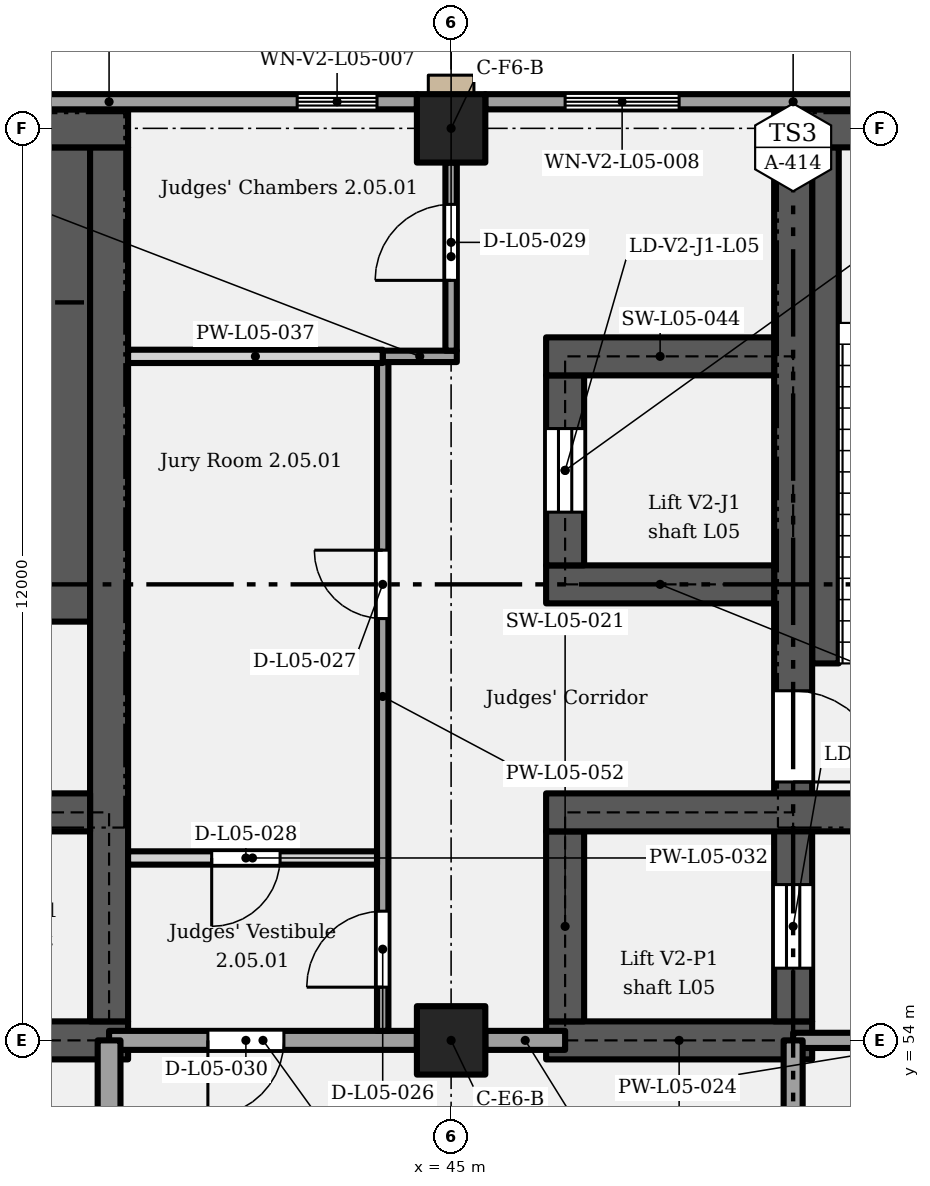
"""IFC4 building model, lengths in metres.
Left out: names, types, materials, properties, quantities, classifications, styles, units other than length and angle.
Written with IfcOpenShell. Run it as: python <this file> out.ifc"""

import sys

from ifc_helpers import new_model, si_unit, direction, frame, frame_2d, origin, origin_2d, place, context, subcontext, project, spatial, rectangle, extrude, element, fill, save


model = new_model("IFC4")
c1 = context("Model", 3, precision=1e-05, world=origin(), true_north=direction((0.0, 1.0)))
c2 = subcontext(c1, "Body", "Model", "MODEL_VIEW")
j1 = project(units=[si_unit("LENGTHUNIT", "METRE"), si_unit("PLANEANGLEUNIT", "RADIAN")], contexts=[c1])
p1 = place(None, origin())
s1 = spatial("IfcSite", under=j1, at=p1, CompositionType="ELEMENT")
p2 = place(p1, origin())
s2 = spatial("IfcBuilding", under=s1, at=p2, CompositionType="ELEMENT")
p3 = place(p2, frame((0.0, 0.0, 28.2)))
s3 = spatial("IfcBuildingStorey", under=s2, at=p3, CompositionType="ELEMENT", Elevation=28.2)
for number, where, z_axis, x_axis in (
    (1, (45.0, 54.0, 0.0), (0.0, 0.0, 1.0), (1.0, 0.0, 0.0)),
    (2, (45.0, 66.0, 0.0), (0.0, 0.0, 1.0), (1.0, 0.0, 0.0)),
):
    element("IfcColumn", number, at=place(p3, frame(where, z_axis=z_axis, x_axis=x_axis)), inside=s3, PredefinedType="COLUMN", context=c2, shape_type="SweptSolid", body=[
        extrude(rectangle(XDim=0.9, YDim=0.9, at=origin_2d()), origin(), (0.0, 0.0, 1.0), 5.4),
    ])
p4 = place(p3, frame((38.15, 54.0, 0.0), z_axis=(0.0, 0.0, 1.0), x_axis=(1.0, 0.0, 0.0)))
e3 = element("IfcWall", 3, at=p4, inside=s3, PredefinedType="SHEAR", context=c2, shape_type="SweptSolid", body=[
    extrude(rectangle(XDim=2.6, YDim=0.5, at=frame_2d((1.3, 0.0))), origin(), (0.0, 0.0, 1.0), 5.15),
])
p5 = place(p3, frame((46.25, 54.0, 0.0), z_axis=(0.0, 0.0, 1.0), x_axis=(1.0, 0.0, 0.0)))
e4 = element("IfcWall", 4, at=p5, inside=s3, PredefinedType="SHEAR", context=c2, shape_type="SweptSolid", body=[
    extrude(rectangle(XDim=3.5, YDim=0.5, at=frame_2d((1.75, 0.0))), origin(), (0.0, 0.0, 1.0), 5.15),
])
p6 = place(p3, frame((40.5, 54.25, 0.0), z_axis=(0.0, 0.0, 1.0), x_axis=(0.0, 1.0, 0.0)))
e5 = element("IfcWall", 5, at=p6, inside=s3, PredefinedType="SHEAR", context=c2, shape_type="SweptSolid", body=[
    extrude(rectangle(XDim=11.5, YDim=0.5, at=frame_2d((5.75, 0.0))), origin(), (0.0, 0.0, 1.0), 5.15),
])
p7 = place(p3, frame((46.5, 54.25, 0.0), z_axis=(0.0, 0.0, 1.0), x_axis=(0.0, 1.0, 0.0)))
e6 = element("IfcWall", 6, at=p7, inside=s3, PredefinedType="SHEAR", context=c2, shape_type="SweptSolid", body=[
    extrude(rectangle(XDim=2.5, YDim=0.5, at=frame_2d((1.25, 0.0))), origin(), (0.0, 0.0, 1.0), 5.15),
])
p8 = place(p3, frame((49.5, 54.25, 0.0), z_axis=(0.0, 0.0, 1.0), x_axis=(0.0, 1.0, 0.0)))
e7 = element("IfcWall", 7, at=p8, inside=s3, PredefinedType="SHEAR", context=c2, shape_type="SweptSolid", body=[
    extrude(rectangle(XDim=11.5, YDim=0.5, at=frame_2d((5.75, 0.0))), origin(), (0.0, 0.0, 1.0), 5.15),
])
p9 = place(p8, frame((0.7, 0.0, 0.0)))
e8 = element("IfcOpeningElement", 8, at=p9, cuts=e7, PredefinedType="OPENING", context=c2, shape_type="SweptSolid", body=[
    extrude(rectangle(XDim=1.1, YDim=2.1, at=frame_2d((0.55, 1.05))), frame((0.0, 0.26, 0.0), z_axis=(0.0, -1.0, 0.0), x_axis=(1.0, 0.0, 0.0)), (0.0, 0.0, 1.0), 0.52),
])
p10 = place(p8, frame((4.35, 0.0, 0.0), z_axis=(0.0, 0.0, 1.0), x_axis=(-1.0, 0.0, 0.0)))
e9 = element("IfcOpeningElement", 9, at=p10, cuts=e7, PredefinedType="OPENING", context=c2, shape_type="SweptSolid", body=[
    extrude(rectangle(XDim=1.2, YDim=2.1, at=frame_2d((0.6, 1.05))), frame((0.0, 0.26, 0.0), z_axis=(0.0, -1.0, 0.0), x_axis=(1.0, 0.0, 0.0)), (0.0, 0.0, 1.0), 0.52),
])
p11 = place(p3, frame((35.75, 57.0, 0.0), z_axis=(0.0, 0.0, 1.0), x_axis=(1.0, 0.0, 0.0)))
e10 = element("IfcWall", 10, at=p11, inside=s3, PredefinedType="SHEAR", context=c2, shape_type="SweptSolid", body=[
    extrude(rectangle(XDim=4.5, YDim=0.5, at=frame_2d((2.25, 0.0))), origin(), (0.0, 0.0, 1.0), 5.15),
])
p12 = place(p11, frame((0.85, 0.0, 0.0)))
e11 = element("IfcOpeningElement", 11, at=p12, cuts=e10, PredefinedType="OPENING", context=c2, shape_type="SweptSolid", body=[
    extrude(rectangle(XDim=1.2, YDim=2.1, at=frame_2d((0.6, 1.05))), frame((0.0, 0.26, 0.0), z_axis=(0.0, -1.0, 0.0), x_axis=(1.0, 0.0, 0.0)), (0.0, 0.0, 1.0), 0.52),
])
p13 = place(p3, frame((46.25, 57.0, 0.0), z_axis=(0.0, 0.0, 1.0), x_axis=(1.0, 0.0, 0.0)))
e12 = element("IfcWall", 12, at=p13, inside=s3, PredefinedType="SHEAR", context=c2, shape_type="SweptSolid", body=[
    extrude(rectangle(XDim=11.0, YDim=0.5, at=frame_2d((5.5, 0.0))), origin(), (0.0, 0.0, 1.0), 5.15),
])
p14 = place(p13, frame((4.9, 0.0, 0.0)))
e13 = element("IfcOpeningElement", 13, at=p14, cuts=e12, PredefinedType="OPENING", context=c2, shape_type="SweptSolid", body=[
    extrude(rectangle(XDim=1.2, YDim=2.1, at=frame_2d((0.6, 1.05))), frame((0.0, 0.26, 0.0), z_axis=(0.0, -1.0, 0.0), x_axis=(1.0, 0.0, 0.0)), (0.0, 0.0, 1.0), 0.52),
])
p15 = place(p3, frame((46.25, 60.0, 0.0), z_axis=(0.0, 0.0, 1.0), x_axis=(1.0, 0.0, 0.0)))
e14 = element("IfcWall", 14, at=p15, inside=s3, PredefinedType="SHEAR", context=c2, shape_type="SweptSolid", body=[
    extrude(rectangle(XDim=3.0, YDim=0.5, at=frame_2d((1.5, 0.0))), origin(), (0.0, 0.0, 1.0), 5.15),
])
p16 = place(p3, frame((46.5, 60.25, 0.0), z_axis=(0.0, 0.0, 1.0), x_axis=(0.0, 1.0, 0.0)))
e15 = element("IfcWall", 15, at=p16, inside=s3, PredefinedType="SHEAR", context=c2, shape_type="SweptSolid", body=[
    extrude(rectangle(XDim=2.5, YDim=0.5, at=frame_2d((1.25, 0.0))), origin(), (0.0, 0.0, 1.0), 5.15),
])
p17 = place(p16, frame((0.7, 0.0, 0.0)))
e16 = element("IfcOpeningElement", 16, at=p17, cuts=e15, PredefinedType="OPENING", context=c2, shape_type="SweptSolid", body=[
    extrude(rectangle(XDim=1.1, YDim=2.1, at=frame_2d((0.55, 1.05))), frame((0.0, 0.26, 0.0), z_axis=(0.0, -1.0, 0.0), x_axis=(1.0, 0.0, 0.0)), (0.0, 0.0, 1.0), 0.52),
])
p18 = place(p3, frame((46.25, 63.0, 0.0), z_axis=(0.0, 0.0, 1.0), x_axis=(1.0, 0.0, 0.0)))
e17 = element("IfcWall", 17, at=p18, inside=s3, PredefinedType="SHEAR", context=c2, shape_type="SweptSolid", body=[
    extrude(rectangle(XDim=3.0, YDim=0.5, at=frame_2d((1.5, 0.0))), origin(), (0.0, 0.0, 1.0), 5.15),
])
for number, where, z_axis, x_axis in (
    (18, (36.45, 66.0, 0.0), (0.0, 0.0, 1.0), (1.0, 0.0, 0.0)),
    (19, (49.25, 66.0, 0.0), (0.0, 0.0, 1.0), (1.0, 0.0, 0.0)),
):
    element("IfcWall", number, at=place(p3, frame(where, z_axis=z_axis, x_axis=x_axis)), inside=s3, PredefinedType="SHEAR", context=c2, shape_type="SweptSolid", body=[
        extrude(rectangle(XDim=4.3, YDim=0.5, at=frame_2d((2.15, 0.0))), origin(), (0.0, 0.0, 1.0), 5.15),
    ])
p19 = place(p3, frame((36.45, 66.35, 0.0), z_axis=(0.0, 0.0, 1.0), x_axis=(1.0, 0.0, 0.0)))
e20 = element("IfcWall", 20, at=p19, inside=s3, PredefinedType="SOLIDWALL", context=c2, shape_type="SweptSolid", body=[
    extrude(rectangle(XDim=8.1, YDim=0.2, at=frame_2d((4.05, 0.0))), origin(), (0.0, 0.0, 1.0), 5.15),
])
p20 = place(p19, frame((6.525, 0.0, 1.05)))
e21 = element("IfcOpeningElement", 21, at=p20, cuts=e20, PredefinedType="OPENING", context=c2, shape_type="SweptSolid", body=[
    extrude(rectangle(XDim=1.05, YDim=2.4, at=frame_2d((0.525, 1.2))), frame((0.0, 0.11, 0.0), z_axis=(0.0, -1.0, 0.0), x_axis=(1.0, 0.0, 0.0)), (0.0, 0.0, 1.0), 0.22),
])
p21 = place(p3, frame((45.45, 66.35, 0.0), z_axis=(0.0, 0.0, 1.0), x_axis=(1.0, 0.0, 0.0)))
e22 = element("IfcWall", 22, at=p21, inside=s3, PredefinedType="SOLIDWALL", context=c2, shape_type="SweptSolid", body=[
    extrude(rectangle(XDim=8.1, YDim=0.2, at=frame_2d((4.05, 0.0))), origin(), (0.0, 0.0, 1.0), 5.15),
])
p22 = place(p21, frame((1.05, 0.0, 1.05)))
e23 = element("IfcOpeningElement", 23, at=p22, cuts=e22, PredefinedType="OPENING", context=c2, shape_type="SweptSolid", body=[
    extrude(rectangle(XDim=1.5, YDim=3.5, at=frame_2d((0.75, 1.75))), frame((0.0, 0.11, 0.0), z_axis=(0.0, -1.0, 0.0), x_axis=(1.0, 0.0, 0.0)), (0.0, 0.0, 1.0), 0.22),
])
p23 = place(p3, frame((40.5, 54.0, 0.0), z_axis=(0.0, 0.0, 1.0), x_axis=(1.0, 0.0, 0.0)))
e24 = element("IfcWall", 24, at=p23, inside=s3, PredefinedType="PARTITIONING", context=c2, shape_type="SweptSolid", body=[
    extrude(rectangle(XDim=4.05, YDim=0.25, at=frame_2d((2.025, 0.0))), origin(), (0.0, 0.0, 1.0), 4.4),
])
p24 = place(p23, frame((2.3, 0.0, 0.0), z_axis=(0.0, 0.0, 1.0), x_axis=(-1.0, 0.0, 0.0)))
e25 = element("IfcOpeningElement", 25, at=p24, cuts=e24, PredefinedType="OPENING", context=c2, shape_type="SweptSolid", body=[
    extrude(rectangle(XDim=1.0, YDim=2.1, at=frame_2d((0.5, 1.05))), frame((0.0, 0.135, 0.0), z_axis=(0.0, -1.0, 0.0), x_axis=(1.0, 0.0, 0.0)), (0.0, 0.0, 1.0), 0.27),
])
p25 = place(p3, frame((45.45, 54.0, 0.0), z_axis=(0.0, 0.0, 1.0), x_axis=(1.0, 0.0, 0.0)))
e26 = element("IfcWall", 26, at=p25, inside=s3, PredefinedType="PARTITIONING", context=c2, shape_type="SweptSolid", body=[
    extrude(rectangle(XDim=1.05, YDim=0.25, at=frame_2d((0.525, 0.0))), origin(), (0.0, 0.0, 1.0), 4.4),
])
p26 = place(p3, frame((49.5, 54.0, 0.0), z_axis=(0.0, 0.0, 1.0), x_axis=(1.0, 0.0, 0.0)))
e27 = element("IfcWall", 27, at=p26, inside=s3, PredefinedType="PARTITIONING", context=c2, shape_type="SweptSolid", body=[
    extrude(rectangle(XDim=4.05, YDim=0.2, at=frame_2d((2.025, 0.0))), origin(), (0.0, 0.0, 1.0), 4.4),
])
p27 = place(p26, frame((1.35, 0.0, 0.0)))
e28 = element("IfcOpeningElement", 28, at=p27, cuts=e27, PredefinedType="OPENING", context=c2, shape_type="SweptSolid", body=[
    extrude(rectangle(XDim=1.8, YDim=2.1, at=frame_2d((0.9, 1.05))), frame((0.0, 0.11, 0.0), z_axis=(0.0, -1.0, 0.0), x_axis=(1.0, 0.0, 0.0)), (0.0, 0.0, 1.0), 0.22),
])
p28 = place(p3, frame((40.75, 56.4, 0.0), z_axis=(0.0, 0.0, 1.0), x_axis=(1.0, 0.0, 0.0)))
e29 = element("IfcWall", 29, at=p28, inside=s3, PredefinedType="PARTITIONING", context=c2, shape_type="SweptSolid", body=[
    extrude(rectangle(XDim=3.275, YDim=0.175, at=frame_2d((1.637, 0.0))), origin(), (0.0, 0.0, 1.0), 5.15),
])
p29 = place(p28, frame((2.0, 0.0, 0.0), z_axis=(0.0, 0.0, 1.0), x_axis=(-1.0, 0.0, 0.0)))
e30 = element("IfcOpeningElement", 30, at=p29, cuts=e29, PredefinedType="OPENING", context=c2, shape_type="SweptSolid", body=[
    extrude(rectangle(XDim=0.9, YDim=2.1, at=frame_2d((0.45, 1.05))), frame((0.0, 0.097, 0.0), z_axis=(0.0, -1.0, 0.0), x_axis=(1.0, 0.0, 0.0)), (0.0, 0.0, 1.0), 0.195),
])
p30 = place(p3, frame((40.75, 63.0, 0.0), z_axis=(0.0, 0.0, 1.0), x_axis=(1.0, 0.0, 0.0)))
e31 = element("IfcWall", 31, at=p30, inside=s3, PredefinedType="PARTITIONING", context=c2, shape_type="SweptSolid", body=[
    extrude(rectangle(XDim=3.35, YDim=0.175, at=frame_2d((1.675, 0.0))), origin(), (0.0, 0.0, 1.0), 5.15),
])
p31 = place(p3, frame((44.1, 63.0, 0.0), z_axis=(0.0, 0.0, 1.0), x_axis=(1.0, 0.0, 0.0)))
e32 = element("IfcWall", 32, at=p31, inside=s3, PredefinedType="PARTITIONING", context=c2, shape_type="SweptSolid", body=[
    extrude(rectangle(XDim=0.975, YDim=0.15, at=frame_2d((0.487, 0.0))), origin(), (0.0, 0.0, 1.0), 5.15),
])
p32 = place(p3, frame((40.5, 43.65, 0.0), z_axis=(0.0, 0.0, 1.0), x_axis=(0.0, 1.0, 0.0)))
e33 = element("IfcWall", 33, at=p32, inside=s3, PredefinedType="PARTITIONING", context=c2, shape_type="SweptSolid", body=[
    extrude(rectangle(XDim=10.35, YDim=0.3, at=frame_2d((5.175, 0.0))), origin(), (0.0, 0.0, 1.0), 5.15),
])
p33 = place(p32, frame((9.1, 0.0, 0.0), z_axis=(0.0, 0.0, 1.0), x_axis=(-1.0, 0.0, 0.0)))
e34 = element("IfcOpeningElement", 34, at=p33, cuts=e33, PredefinedType="OPENING", context=c2, shape_type="SweptSolid", body=[
    extrude(rectangle(XDim=1.0, YDim=2.0, at=frame_2d((0.5, 1.0))), frame((0.0, 0.16, 0.0), z_axis=(0.0, -1.0, 0.0), x_axis=(1.0, 0.0, 0.0)), (0.0, 0.0, 1.0), 0.32),
])
p34 = place(p3, frame((44.1, 54.125, 0.0), z_axis=(0.0, 0.0, 1.0), x_axis=(0.0, 1.0, 0.0)))
e35 = element("IfcWall", 35, at=p34, inside=s3, PredefinedType="PARTITIONING", context=c2, shape_type="SweptSolid", body=[
    extrude(rectangle(XDim=8.8, YDim=0.15, at=frame_2d((4.4, 0.0))), origin(), (0.0, 0.0, 1.0), 5.15),
])
p35 = place(p34, frame((0.575, 0.0, 0.0)))
e36 = element("IfcOpeningElement", 36, at=p35, cuts=e35, PredefinedType="OPENING", context=c2, shape_type="SweptSolid", body=[
    extrude(rectangle(XDim=1.0, YDim=2.1, at=frame_2d((0.5, 1.05))), frame((0.0, 0.085, 0.0), z_axis=(0.0, -1.0, 0.0), x_axis=(1.0, 0.0, 0.0)), (0.0, 0.0, 1.0), 0.17),
])
p36 = place(p34, frame((5.425, 0.0, 0.0)))
e37 = element("IfcOpeningElement", 37, at=p36, cuts=e35, PredefinedType="OPENING", context=c2, shape_type="SweptSolid", body=[
    extrude(rectangle(XDim=0.9, YDim=2.1, at=frame_2d((0.45, 1.05))), frame((0.0, 0.085, 0.0), z_axis=(0.0, -1.0, 0.0), x_axis=(1.0, 0.0, 0.0)), (0.0, 0.0, 1.0), 0.17),
])
p37 = place(p3, frame((45.0, 63.075, 0.0), z_axis=(0.0, 0.0, 1.0), x_axis=(0.0, 1.0, 0.0)))
e38 = element("IfcWall", 38, at=p37, inside=s3, PredefinedType="PARTITIONING", context=c2, shape_type="SweptSolid", body=[
    extrude(rectangle(XDim=2.475, YDim=0.15, at=frame_2d((1.238, 0.0))), origin(), (0.0, 0.0, 1.0), 4.4),
])
p38 = place(p37, frame((0.925, 0.0, 0.0)))
e39 = element("IfcOpeningElement", 39, at=p38, cuts=e38, PredefinedType="OPENING", context=c2, shape_type="SweptSolid", body=[
    extrude(rectangle(XDim=1.0, YDim=2.1, at=frame_2d((0.5, 1.05))), frame((0.0, 0.085, 0.0), z_axis=(0.0, -1.0, 0.0), x_axis=(1.0, 0.0, 0.0)), (0.0, 0.0, 1.0), 0.17),
])
p39 = place(p3, frame((49.5, 43.5, 0.0), z_axis=(0.0, 0.0, 1.0), x_axis=(0.0, 1.0, 0.0)))
e40 = element("IfcWall", 40, at=p39, inside=s3, PredefinedType="PARTITIONING", context=c2, shape_type="SweptSolid", body=[
    extrude(rectangle(XDim=10.5, YDim=0.25, at=frame_2d((5.25, 0.0))), origin(), (0.0, 0.0, 1.0), 5.15),
])
p40 = place(p39, frame((0.6, 0.0, 0.0)))
e41 = element("IfcOpeningElement", 41, at=p40, cuts=e40, PredefinedType="OPENING", context=c2, shape_type="SweptSolid", body=[
    extrude(rectangle(XDim=1.8, YDim=2.4, at=frame_2d((0.9, 1.2))), frame((0.0, 0.135, 0.0), z_axis=(0.0, -1.0, 0.0), x_axis=(1.0, 0.0, 0.0)), (0.0, 0.0, 1.0), 0.27),
])
p41 = place(p39, frame((7.1, 0.0, 0.0)))
e42 = element("IfcOpeningElement", 42, at=p41, cuts=e40, PredefinedType="OPENING", context=c2, shape_type="SweptSolid", body=[
    extrude(rectangle(XDim=1.8, YDim=2.4, at=frame_2d((0.9, 1.2))), frame((0.0, 0.135, 0.0), z_axis=(0.0, -1.0, 0.0), x_axis=(1.0, 0.0, 0.0)), (0.0, 0.0, 1.0), 0.27),
])
p42 = place(p3, frame((39.905, 59.51, 0.0), z_axis=(0.0, 0.0, 1.0), x_axis=(0.0, 1.0, 0.0)))
e43 = element("IfcWall", 43, at=p42, inside=s3, PredefinedType="SHEAR", context=c2, shape_type="SweptSolid", body=[
    extrude(rectangle(XDim=6.24, YDim=0.69, at=frame_2d((3.12, 0.0))), origin(), (0.0, 0.0, 1.0), 2.587),
])
p43 = place(p3, frame((49.925, 58.96, 0.0), z_axis=(0.0, 0.0, 1.0), x_axis=(0.0, 1.0, 0.0)))
e44 = element("IfcWall", 44, at=p43, inside=s3, PredefinedType="SHEAR", context=c2, shape_type="SweptSolid", body=[
    extrude(rectangle(XDim=6.79, YDim=0.35, at=frame_2d((3.395, 0.0))), origin(), (0.0, 0.0, 1.0), 2.587),
])
p44 = place(p20, origin())
e45 = element("IfcWindow", 45, at=p44, inside=s3, PartitioningType="SINGLE_PANEL", PredefinedType="WINDOW", context=c2, shape_type="SweptSolid", body=[
    extrude(rectangle(XDim=1.05, YDim=2.4, at=frame_2d((0.525, 1.2))), frame((0.0, 0.03, 0.0), z_axis=(0.0, -1.0, 0.0), x_axis=(1.0, 0.0, 0.0)), (0.0, 0.0, 1.0), 0.06),
])
fill(e21, e45)
p45 = place(p22, origin())
e46 = element("IfcWindow", 46, at=p45, inside=s3, PartitioningType="SINGLE_PANEL", PredefinedType="WINDOW", context=c2, shape_type="SweptSolid", body=[
    extrude(rectangle(XDim=1.5, YDim=3.5, at=frame_2d((0.75, 1.75))), frame((0.0, 0.03, 0.0), z_axis=(0.0, -1.0, 0.0), x_axis=(1.0, 0.0, 0.0)), (0.0, 0.0, 1.0), 0.06),
])
fill(e23, e46)
p46 = place(p9, origin())
e47 = element("IfcDoor", 47, at=p46, inside=s3, OperationType="SLIDING_TO_LEFT", PredefinedType="DOOR", context=c2, shape_type="SweptSolid", body=[
    extrude(rectangle(XDim=1.1, YDim=2.1, at=frame_2d((0.55, 1.05))), frame((0.0, 0.025, 0.0), z_axis=(0.0, -1.0, 0.0), x_axis=(1.0, 0.0, 0.0)), (0.0, 0.0, 1.0), 0.05),
])
fill(e8, e47)
p47 = place(p17, origin())
e48 = element("IfcDoor", 48, at=p47, inside=s3, OperationType="SLIDING_TO_LEFT", PredefinedType="DOOR", context=c2, shape_type="SweptSolid", body=[
    extrude(rectangle(XDim=1.1, YDim=2.1, at=frame_2d((0.55, 1.05))), frame((0.0, 0.025, 0.0), z_axis=(0.0, -1.0, 0.0), x_axis=(1.0, 0.0, 0.0)), (0.0, 0.0, 1.0), 0.05),
])
fill(e16, e48)
p48 = place(p10, origin())
e49 = element("IfcDoor", 49, at=p48, inside=s3, OperationType="SINGLE_SWING_RIGHT", PredefinedType="DOOR", context=c2, shape_type="SweptSolid", body=[
    extrude(rectangle(XDim=1.2, YDim=2.1, at=frame_2d((0.6, 1.05))), frame((0.0, 0.025, 0.0), z_axis=(0.0, -1.0, 0.0), x_axis=(1.0, 0.0, 0.0)), (0.0, 0.0, 1.0), 0.05),
])
fill(e9, e49)
p49 = place(p35, origin())
e50 = element("IfcDoor", 50, at=p49, inside=s3, OperationType="SINGLE_SWING_LEFT", PredefinedType="DOOR", context=c2, shape_type="SweptSolid", body=[
    extrude(rectangle(XDim=1.0, YDim=2.1, at=frame_2d((0.5, 1.05))), frame((0.0, 0.025, 0.0), z_axis=(0.0, -1.0, 0.0), x_axis=(1.0, 0.0, 0.0)), (0.0, 0.0, 1.0), 0.05),
])
fill(e36, e50)
p50 = place(p36, origin())
e51 = element("IfcDoor", 51, at=p50, inside=s3, OperationType="SINGLE_SWING_RIGHT", PredefinedType="DOOR", context=c2, shape_type="SweptSolid", body=[
    extrude(rectangle(XDim=0.9, YDim=2.1, at=frame_2d((0.45, 1.05))), frame((0.0, 0.025, 0.0), z_axis=(0.0, -1.0, 0.0), x_axis=(1.0, 0.0, 0.0)), (0.0, 0.0, 1.0), 0.05),
])
fill(e37, e51)
p51 = place(p29, origin())
e52 = element("IfcDoor", 52, at=p51, inside=s3, OperationType="SINGLE_SWING_RIGHT", PredefinedType="DOOR", context=c2, shape_type="SweptSolid", body=[
    extrude(rectangle(XDim=0.9, YDim=2.1, at=frame_2d((0.45, 1.05))), frame((0.0, 0.025, 0.0), z_axis=(0.0, -1.0, 0.0), x_axis=(1.0, 0.0, 0.0)), (0.0, 0.0, 1.0), 0.05),
])
fill(e30, e52)
p52 = place(p38, origin())
e53 = element("IfcDoor", 53, at=p52, inside=s3, OperationType="SINGLE_SWING_LEFT", PredefinedType="DOOR", context=c2, shape_type="SweptSolid", body=[
    extrude(rectangle(XDim=1.0, YDim=2.1, at=frame_2d((0.5, 1.05))), frame((0.0, 0.025, 0.0), z_axis=(0.0, -1.0, 0.0), x_axis=(1.0, 0.0, 0.0)), (0.0, 0.0, 1.0), 0.05),
])
fill(e39, e53)
p53 = place(p24, origin())
e54 = element("IfcDoor", 54, at=p53, inside=s3, OperationType="SINGLE_SWING_RIGHT", PredefinedType="DOOR", context=c2, shape_type="SweptSolid", body=[
    extrude(rectangle(XDim=1.0, YDim=2.1, at=frame_2d((0.5, 1.05))), frame((0.0, 0.025, 0.0), z_axis=(0.0, -1.0, 0.0), x_axis=(1.0, 0.0, 0.0)), (0.0, 0.0, 1.0), 0.05),
])
fill(e25, e54)
save(model, sys.argv[1])
